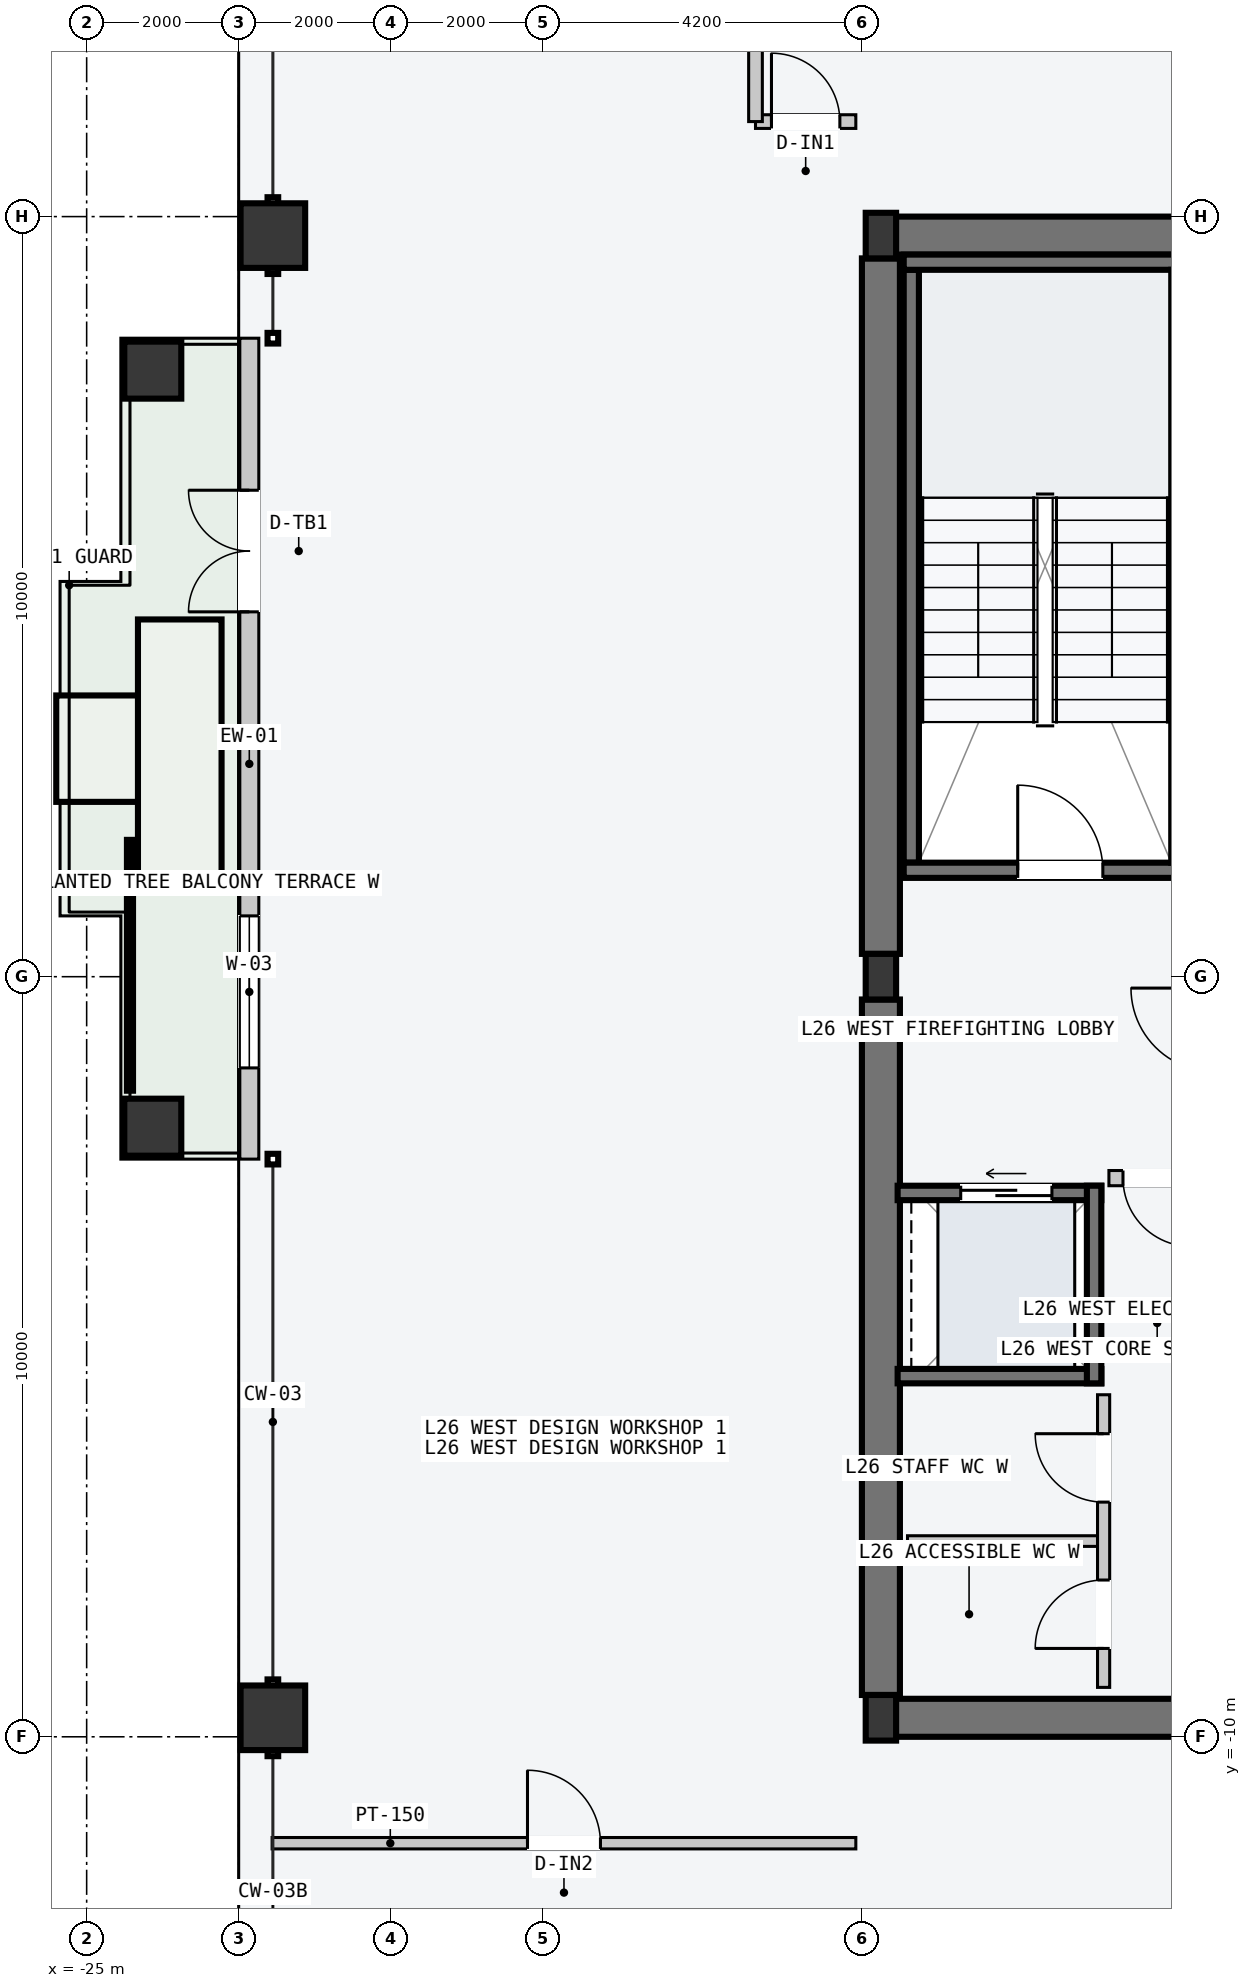
"""IFC4 building model, lengths in metres.
Left out: names, types, materials, properties, quantities, classifications, styles, units other than length and angle.
Written with IfcOpenShell. Run it as: python <this file> out.ifc"""

import sys

from ifc_helpers import new_model, si_unit, direction, frame, frame_2d, origin, origin_2d, place, context, subcontext, project, spatial, rectangle, hollow_rectangle, i_section, extrude, element, fill, save


model = new_model("IFC4")
c1 = context("Model", 3, precision=1e-05, world=origin(), true_north=direction((0.0, 1.0)))
c2 = subcontext(c1, "Body", "Model", "MODEL_VIEW")
j1 = project(units=[si_unit("LENGTHUNIT", "METRE"), si_unit("PLANEANGLEUNIT", "RADIAN")], contexts=[c1])
p1 = place(None, origin())
s1 = spatial("IfcSite", under=j1, at=p1, CompositionType="ELEMENT")
p2 = place(p1, origin())
s2 = spatial("IfcBuilding", under=s1, at=p2, CompositionType="ELEMENT")
p3 = place(p2, frame((0.0, 0.0, 102.6)))
s3 = spatial("IfcBuildingStorey", under=s2, at=p3, CompositionType="ELEMENT", Elevation=102.6)
for number, where, z_axis, x_axis in (
    (1, (-14.53, -9.75, -0.2), (0.0, 0.0, 1.0), (1.0, 0.0, 0.0)),
    (2, (-14.53, 9.75, -0.2), (0.0, 0.0, 1.0), (1.0, 0.0, 0.0)),
):
    element("IfcWall", number, at=place(p3, frame(where, z_axis=z_axis, x_axis=x_axis)), inside=s3, PredefinedType="SHEAR", context=c2, shape_type="SweptSolid", body=[
        extrude(rectangle(XDim=6.46, YDim=0.5, at=frame_2d((3.23, 0.0))), origin(), (0.0, 0.0, 1.0), 3.6),
    ])
for number, where, z_axis, x_axis in (
    (3, (-14.55, -9.45, -0.2), (0.0, 0.0, 1.0), (0.0, 1.0, 0.0)),
    (4, (-14.55, 0.3, -0.2), (0.0, 0.0, 1.0), (0.0, 1.0, 0.0)),
):
    element("IfcWall", number, at=place(p3, frame(where, z_axis=z_axis, x_axis=x_axis)), inside=s3, PredefinedType="SHEAR", context=c2, shape_type="SweptSolid", body=[
        extrude(rectangle(XDim=9.15, YDim=0.5, at=frame_2d((4.575, 0.0))), origin(), (0.0, 0.0, 1.0), 3.6),
    ])
p4 = place(p3, frame((-14.15, 1.5, -0.2), z_axis=(0.0, 0.0, 1.0), x_axis=(0.0, 1.0, 0.0)))
e5 = element("IfcWall", 5, at=p4, inside=s3, PredefinedType="SOLIDWALL", context=c2, shape_type="SweptSolid", body=[
    extrude(rectangle(XDim=7.8, YDim=0.2, at=frame_2d((3.9, 0.0))), origin(), (0.0, 0.0, 1.0), 3.6),
])
p5 = place(p3, frame((-14.25, 1.4, -0.2), z_axis=(0.0, 0.0, 1.0), x_axis=(1.0, 0.0, 0.0)))
e6 = element("IfcWall", 6, at=p5, inside=s3, PredefinedType="SOLIDWALL", context=c2, shape_type="SweptSolid", body=[
    extrude(rectangle(XDim=3.72, YDim=0.2, at=frame_2d((1.86, 0.0))), origin(), (0.0, 0.0, 1.0), 3.6),
])
p6 = place(p5, frame((1.5, 0.0, 0.2)))
e7 = element("IfcOpeningElement", 7, at=p6, cuts=e6, PredefinedType="OPENING", context=c2, shape_type="SweptSolid", body=[
    extrude(rectangle(XDim=1.12, YDim=2.18, at=frame_2d((0.56, 1.09))), frame((0.0, 0.11, 0.0), z_axis=(0.0, -1.0, 0.0), x_axis=(1.0, 0.0, 0.0)), (0.0, 0.0, 1.0), 0.22),
])
p7 = place(p3, frame((-14.25, 9.4, -0.2), z_axis=(0.0, 0.0, 1.0), x_axis=(1.0, 0.0, 0.0)))
e8 = element("IfcWall", 8, at=p7, inside=s3, PredefinedType="SOLIDWALL", context=c2, shape_type="SweptSolid", body=[
    extrude(rectangle(XDim=3.72, YDim=0.2, at=frame_2d((1.86, 0.0))), origin(), (0.0, 0.0, 1.0), 3.6),
])
p8 = place(p3, frame((-10.63, 1.5, -0.2), z_axis=(0.0, 0.0, 1.0), x_axis=(0.0, 1.0, 0.0)))
e9 = element("IfcWall", 9, at=p8, inside=s3, PredefinedType="SOLIDWALL", context=c2, shape_type="SweptSolid", body=[
    extrude(rectangle(XDim=7.8, YDim=0.2, at=frame_2d((3.9, 0.0))), origin(), (0.0, 0.0, 1.0), 3.6),
])
for number, where, z_axis, x_axis in (
    (10, (-14.55, -9.75, 0.0), (0.0, 0.0, 1.0), (1.0, 0.0, 0.0)),
    (11, (-14.55, 0.0, 0.0), (0.0, 0.0, 1.0), (1.0, 0.0, 0.0)),
    (12, (-14.55, 9.75, 0.0), (0.0, 0.0, 1.0), (1.0, 0.0, 0.0)),
):
    element("IfcColumn", number, at=place(p3, frame(where, z_axis=z_axis, x_axis=x_axis)), inside=s3, PredefinedType="COLUMN", context=c2, shape_type="SweptSolid", body=[
        extrude(i_section(OverallWidth=0.4, OverallDepth=0.6, WebThickness=0.022, FlangeThickness=0.036, at=origin_2d()), origin(), (0.0, 0.0, 1.0), 3.6),
    ])
for number, where, z_axis, x_axis in (
    (13, (-22.55, -9.75, 0.0), (0.0, 0.0, 1.0), (0.0, 1.0, 0.0)),
    (14, (-22.55, 9.75, 0.0), (0.0, 0.0, 1.0), (0.0, 1.0, 0.0)),
):
    element("IfcColumn", number, at=place(p3, frame(where, z_axis=z_axis, x_axis=x_axis)), inside=s3, PredefinedType="COLUMN", context=c2, shape_type="SweptSolid", body=[
        extrude(hollow_rectangle(XDim=0.85, YDim=0.85, WallThickness=0.04, at=origin_2d()), origin(), (0.0, 0.0, 1.0), 3.6),
    ])
for number, where, z_axis, x_axis in (
    (15, (-24.13, -1.98, 0.0), (0.0, 0.0, 1.0), (0.0, 1.0, 0.0)),
    (16, (-24.13, 7.98, 0.0), (0.0, 0.0, 1.0), (0.0, 1.0, 0.0)),
):
    element("IfcColumn", number, at=place(p3, frame(where, z_axis=z_axis, x_axis=x_axis)), inside=s3, PredefinedType="COLUMN", context=c2, shape_type="SweptSolid", body=[
        extrude(hollow_rectangle(XDim=0.75, YDim=0.75, WallThickness=0.032, at=origin_2d()), origin(), (0.0, 0.0, 1.0), 3.6),
    ])
p9 = place(p3, frame((-22.86, -2.4, 0.0), z_axis=(0.0, 0.0, 1.0), x_axis=(0.0, 1.0, 0.0)))
e17 = element("IfcWall", 17, at=p9, inside=s3, PredefinedType="STANDARD", context=c2, shape_type="SweptSolid", body=[
    extrude(rectangle(XDim=10.8, YDim=0.25, at=frame_2d((5.4, 0.0))), origin(), (0.0, 0.0, 1.0), 3.4),
])
p10 = place(p9, frame((7.2, 0.0, 0.0)))
e18 = element("IfcOpeningElement", 18, at=p10, cuts=e17, PredefinedType="OPENING", context=c2, shape_type="SweptSolid", body=[
    extrude(rectangle(XDim=1.6, YDim=2.2, at=frame_2d((0.8, 1.1))), frame((0.0, 0.135, 0.0), z_axis=(0.0, -1.0, 0.0), x_axis=(1.0, 0.0, 0.0)), (0.0, 0.0, 1.0), 0.27),
])
p11 = place(p9, frame((1.2, 0.0, 0.85)))
e19 = element("IfcOpeningElement", 19, at=p11, cuts=e17, PredefinedType="OPENING", context=c2, shape_type="SweptSolid", body=[
    extrude(rectangle(XDim=2.0, YDim=2.1, at=frame_2d((1.0, 1.05))), frame((0.0, 0.135, 0.0), z_axis=(0.0, -1.0, 0.0), x_axis=(1.0, 0.0, 0.0)), (0.0, 0.0, 1.0), 0.27),
])
p12 = place(p3, frame((-14.33, -2.845, -0.2), z_axis=(0.0, 0.0, 1.0), x_axis=(1.0, 0.0, 0.0)))
e20 = element("IfcWall", 20, at=p12, inside=s3, PredefinedType="SOLIDWALL", context=c2, shape_type="SweptSolid", body=[
    extrude(rectangle(XDim=2.68, YDim=0.19, at=frame_2d((1.34, 0.0))), origin(), (0.0, 0.0, 1.0), 3.6),
])
p13 = place(p12, frame((0.83, 0.0, 0.2)))
e21 = element("IfcOpeningElement", 21, at=p13, cuts=e20, PredefinedType="OPENING", context=c2, shape_type="SweptSolid", body=[
    extrude(rectangle(XDim=1.2, YDim=2.2, at=frame_2d((0.6, 1.1))), frame((0.0, 0.105, 0.0), z_axis=(0.0, -1.0, 0.0), x_axis=(1.0, 0.0, 0.0)), (0.0, 0.0, 1.0), 0.21),
])
p14 = place(p3, frame((-14.33, -5.255, -0.2), z_axis=(0.0, 0.0, 1.0), x_axis=(1.0, 0.0, 0.0)))
e22 = element("IfcWall", 22, at=p14, inside=s3, PredefinedType="SOLIDWALL", context=c2, shape_type="SweptSolid", body=[
    extrude(rectangle(XDim=2.68, YDim=0.19, at=frame_2d((1.34, 0.0))), origin(), (0.0, 0.0, 1.0), 3.6),
])
p15 = place(p3, frame((-11.745, -5.35, -0.2), z_axis=(0.0, 0.0, 1.0), x_axis=(0.0, 1.0, 0.0)))
e23 = element("IfcWall", 23, at=p15, inside=s3, PredefinedType="SOLIDWALL", context=c2, shape_type="SweptSolid", body=[
    extrude(rectangle(XDim=2.6, YDim=0.19, at=frame_2d((1.3, 0.0))), origin(), (0.0, 0.0, 1.0), 3.6),
])
p16 = place(p3, frame((-10.28, -2.65, 0.0), z_axis=(0.0, 0.0, 1.0), x_axis=(-1.0, 0.0, 0.0)))
e24 = element("IfcWall", 24, at=p16, inside=s3, PredefinedType="PARTITIONING", context=c2, shape_type="SweptSolid", body=[
    extrude(rectangle(XDim=1.27, YDim=0.2, at=frame_2d((0.635, 0.0))), origin(), (0.0, 0.0, 1.0), 3.4),
])
p17 = place(p16, frame((0.185, 0.0, 0.0)))
e25 = element("IfcOpeningElement", 25, at=p17, cuts=e24, PredefinedType="OPENING", context=c2, shape_type="SweptSolid", body=[
    extrude(rectangle(XDim=0.9, YDim=2.15, at=frame_2d((0.45, 1.075))), frame((0.0, 0.11, 0.0), z_axis=(0.0, -1.0, 0.0), x_axis=(1.0, 0.0, 0.0)), (0.0, 0.0, 1.0), 0.22),
])
p18 = place(p3, frame((-11.7, -7.425, 0.0), z_axis=(0.0, 0.0, 1.0), x_axis=(-1.0, 0.0, 0.0)))
e26 = element("IfcWall", 26, at=p18, inside=s3, PredefinedType="PARTITIONING", context=c2, shape_type="SweptSolid", body=[
    extrude(rectangle(XDim=2.5, YDim=0.14, at=frame_2d((1.25, 0.0))), origin(), (0.0, 0.0, 1.0), 3.4),
])
p19 = place(p3, frame((-11.62, -9.35, 0.0), z_axis=(0.0, 0.0, 1.0), x_axis=(0.0, 1.0, 0.0)))
e27 = element("IfcWall", 27, at=p19, inside=s3, PredefinedType="PARTITIONING", context=c2, shape_type="SweptSolid", body=[
    extrude(rectangle(XDim=3.85, YDim=0.16, at=frame_2d((1.925, 0.0))), origin(), (0.0, 0.0, 1.0), 3.4),
])
p20 = place(p19, frame((0.512, 0.0, 0.0)))
e28 = element("IfcOpeningElement", 28, at=p20, cuts=e27, PredefinedType="OPENING", context=c2, shape_type="SweptSolid", body=[
    extrude(rectangle(XDim=0.9, YDim=2.15, at=frame_2d((0.45, 1.075))), frame((0.0, 0.09, 0.0), z_axis=(0.0, -1.0, 0.0), x_axis=(1.0, 0.0, 0.0)), (0.0, 0.0, 1.0), 0.18),
])
p21 = place(p19, frame((2.438, 0.0, 0.0)))
e29 = element("IfcOpeningElement", 29, at=p21, cuts=e27, PredefinedType="OPENING", context=c2, shape_type="SweptSolid", body=[
    extrude(rectangle(XDim=0.9, YDim=2.15, at=frame_2d((0.45, 1.075))), frame((0.0, 0.09, 0.0), z_axis=(0.0, -1.0, 0.0), x_axis=(1.0, 0.0, 0.0)), (0.0, 0.0, 1.0), 0.18),
])
p22 = place(p3, frame((-22.56, -11.4, 0.0), z_axis=(0.0, 0.0, 1.0), x_axis=(1.0, 0.0, 0.0)))
e30 = element("IfcWall", 30, at=p22, inside=s3, PredefinedType="PARTITIONING", context=c2, shape_type="SweptSolid", body=[
    extrude(rectangle(XDim=7.68, YDim=0.15, at=frame_2d((3.84, 0.0))), origin(), (0.0, 0.0, 1.0), 3.4),
])
p23 = place(p22, frame((3.36, 0.0, 0.0)))
e31 = element("IfcOpeningElement", 31, at=p23, cuts=e30, PredefinedType="OPENING", context=c2, shape_type="SweptSolid", body=[
    extrude(rectangle(XDim=0.96, YDim=2.18, at=frame_2d((0.48, 1.09))), frame((0.0, 0.085, 0.0), z_axis=(0.0, -1.0, 0.0), x_axis=(1.0, 0.0, 0.0)), (0.0, 0.0, 1.0), 0.17),
])
p24 = place(p3, frame((-16.2, 11.25, 0.0), z_axis=(0.0, 0.0, 1.0), x_axis=(1.0, 0.0, 0.0)))
e32 = element("IfcWall", 32, at=p24, inside=s3, PredefinedType="PARTITIONING", context=c2, shape_type="SweptSolid", body=[
    extrude(rectangle(XDim=1.32, YDim=0.18, at=frame_2d((0.66, 0.0))), origin(), (0.0, 0.0, 1.0), 3.4),
])
p25 = place(p24, frame((0.21, 0.0, 0.0)))
e33 = element("IfcOpeningElement", 33, at=p25, cuts=e32, PredefinedType="OPENING", context=c2, shape_type="SweptSolid", body=[
    extrude(rectangle(XDim=0.9, YDim=2.15, at=frame_2d((0.45, 1.075))), frame((0.0, 0.1, 0.0), z_axis=(0.0, -1.0, 0.0), x_axis=(1.0, 0.0, 0.0)), (0.0, 0.0, 1.0), 0.2),
])
p26 = place(p3, frame((-16.2, 11.25, 0.0), z_axis=(0.0, 0.0, 1.0), x_axis=(0.0, 1.0, 0.0)))
e34 = element("IfcWall", 34, at=p26, inside=s3, PredefinedType="PARTITIONING", context=c2, shape_type="SweptSolid", body=[
    extrude(rectangle(XDim=1.95, YDim=0.18, at=frame_2d((0.975, 0.0))), origin(), (0.0, 0.0, 1.0), 3.4),
])
p27 = place(p6, origin())
e35 = element("IfcDoor", 35, at=p27, inside=s3, OperationType="SINGLE_SWING_LEFT", PredefinedType="DOOR", context=c2, shape_type="SweptSolid", body=[
    extrude(rectangle(XDim=1.12, YDim=2.18, at=frame_2d((0.56, 1.09))), frame((0.0, 0.025, 0.0), z_axis=(0.0, -1.0, 0.0), x_axis=(1.0, 0.0, 0.0)), (0.0, 0.0, 1.0), 0.05),
])
fill(e7, e35)
p28 = place(p10, origin())
e36 = element("IfcDoor", 36, at=p28, inside=s3, OperationType="DOUBLE_DOOR_SINGLE_SWING", PredefinedType="DOOR", context=c2, shape_type="SweptSolid", body=[
    extrude(rectangle(XDim=1.6, YDim=2.2, at=frame_2d((0.8, 1.1))), frame((0.0, 0.025, 0.0), z_axis=(0.0, -1.0, 0.0), x_axis=(1.0, 0.0, 0.0)), (0.0, 0.0, 1.0), 0.05),
])
fill(e18, e36)
p29 = place(p11, origin())
e37 = element("IfcWindow", 37, at=p29, inside=s3, PartitioningType="SINGLE_PANEL", PredefinedType="WINDOW", context=c2, shape_type="SweptSolid", body=[
    extrude(rectangle(XDim=2.0, YDim=2.1, at=frame_2d((1.0, 1.05))), frame((0.0, 0.03, 0.0), z_axis=(0.0, -1.0, 0.0), x_axis=(1.0, 0.0, 0.0)), (0.0, 0.0, 1.0), 0.06),
])
fill(e19, e37)
p30 = place(p13, origin())
e38 = element("IfcDoor", 38, at=p30, inside=s3, OperationType="SLIDING_TO_LEFT", PredefinedType="DOOR", context=c2, shape_type="SweptSolid", body=[
    extrude(rectangle(XDim=1.2, YDim=2.2, at=frame_2d((0.6, 1.1))), frame((0.0, 0.025, 0.0), z_axis=(0.0, -1.0, 0.0), x_axis=(1.0, 0.0, 0.0)), (0.0, 0.0, 1.0), 0.05),
])
fill(e21, e38)
p31 = place(p17, origin())
e39 = element("IfcDoor", 39, at=p31, inside=s3, OperationType="SINGLE_SWING_LEFT", PredefinedType="DOOR", context=c2, shape_type="SweptSolid", body=[
    extrude(rectangle(XDim=0.9, YDim=2.15, at=frame_2d((0.45, 1.075))), frame((0.0, 0.025, 0.0), z_axis=(0.0, -1.0, 0.0), x_axis=(1.0, 0.0, 0.0)), (0.0, 0.0, 1.0), 0.05),
])
fill(e25, e39)
p32 = place(p20, origin())
e40 = element("IfcDoor", 40, at=p32, inside=s3, OperationType="SINGLE_SWING_LEFT", PredefinedType="DOOR", context=c2, shape_type="SweptSolid", body=[
    extrude(rectangle(XDim=0.9, YDim=2.15, at=frame_2d((0.45, 1.075))), frame((0.0, 0.025, 0.0), z_axis=(0.0, -1.0, 0.0), x_axis=(1.0, 0.0, 0.0)), (0.0, 0.0, 1.0), 0.05),
])
fill(e28, e40)
p33 = place(p21, origin())
e41 = element("IfcDoor", 41, at=p33, inside=s3, OperationType="SINGLE_SWING_RIGHT", PredefinedType="DOOR", context=c2, shape_type="SweptSolid", body=[
    extrude(rectangle(XDim=0.9, YDim=2.15, at=frame_2d((0.45, 1.075))), frame((0.0, 0.025, 0.0), z_axis=(0.0, -1.0, 0.0), x_axis=(1.0, 0.0, 0.0)), (0.0, 0.0, 1.0), 0.05),
])
fill(e29, e41)
p34 = place(p23, origin())
e42 = element("IfcDoor", 42, at=p34, inside=s3, OperationType="SINGLE_SWING_LEFT", PredefinedType="DOOR", context=c2, shape_type="SweptSolid", body=[
    extrude(rectangle(XDim=0.96, YDim=2.18, at=frame_2d((0.48, 1.09))), frame((0.0, 0.025, 0.0), z_axis=(0.0, -1.0, 0.0), x_axis=(1.0, 0.0, 0.0)), (0.0, 0.0, 1.0), 0.05),
])
fill(e31, e42)
p35 = place(p25, origin())
e43 = element("IfcDoor", 43, at=p35, inside=s3, OperationType="SINGLE_SWING_LEFT", PredefinedType="DOOR", context=c2, shape_type="SweptSolid", body=[
    extrude(rectangle(XDim=0.9, YDim=2.15, at=frame_2d((0.45, 1.075))), frame((0.0, 0.025, 0.0), z_axis=(0.0, -1.0, 0.0), x_axis=(1.0, 0.0, 0.0)), (0.0, 0.0, 1.0), 0.05),
])
fill(e33, e43)
save(model, sys.argv[1])
